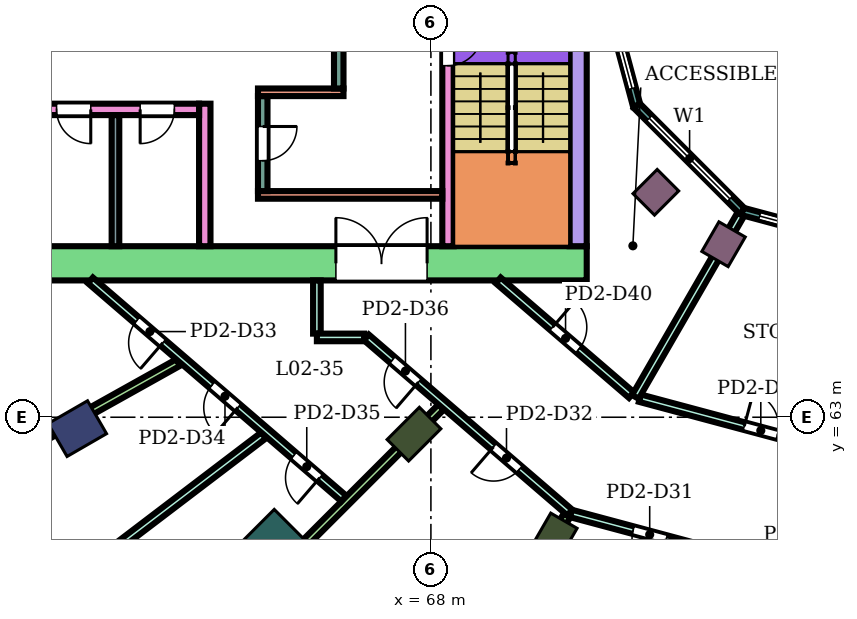
"""IFC4 building model, lengths in metres.
Left out: names, types, materials, properties, quantities, classifications, styles, units other than length and angle.
Written with IfcOpenShell. Run it as: python <this file> out.ifc"""

import sys

from ifc_helpers import new_model, si_unit, direction, frame, frame_2d, origin, origin_2d, place, context, subcontext, project, spatial, rectangle, extrude, element, fill, save


model = new_model("IFC4")
c1 = context("Model", 3, precision=1e-05, world=origin(), true_north=direction((0.0, 1.0)))
c2 = subcontext(c1, "Body", "Model", "MODEL_VIEW")
j1 = project(units=[si_unit("LENGTHUNIT", "METRE"), si_unit("PLANEANGLEUNIT", "RADIAN")], contexts=[c1])
p1 = place(None, origin())
s1 = spatial("IfcSite", under=j1, at=p1, CompositionType="ELEMENT")
p2 = place(p1, origin())
s2 = spatial("IfcBuilding", under=s1, at=p2, CompositionType="ELEMENT")
p3 = place(p2, frame((0.0, 0.0, 12.4)))
s3 = spatial("IfcBuildingStorey", under=s2, at=p3, CompositionType="ELEMENT", Elevation=12.4)
p4 = place(p3, frame((58.696, 62.7, 0.0), z_axis=(0.0, 0.0, 1.0), x_axis=(-0.866025403784, -0.5, 0.0)))
e1 = element("IfcColumn", 1, at=p4, inside=s3, PredefinedType="COLUMN", context=c2, shape_type="SweptSolid", body=[
    extrude(rectangle(XDim=1.2, YDim=1.0, at=origin_2d()), origin(), (0.0, 0.0, 1.0), 5.4),
])
for number, where, z_axis, x_axis in (
    (2, (67.555, 62.555, 0.0), (0.0, 0.0, 1.0), (-0.707, -0.707, 0.0)),
    (3, (71.2, 59.758, 0.0), (0.0, 0.0, 1.0), (-0.5, -0.866, 0.0)),
):
    element("IfcColumn", number, at=place(p3, frame(where, z_axis=z_axis, x_axis=x_axis)), inside=s3, PredefinedType="COLUMN", context=c2, shape_type="SweptSolid", body=[
        extrude(rectangle(XDim=1.2, YDim=0.8, at=origin_2d()), origin(), (0.0, 0.0, 1.0), 5.4),
    ])
for number, where, z_axis, x_axis in (
    (4, (73.919, 68.919, 0.0), (0.0, 0.0, 1.0), (-0.707, -0.707, 0.0)),
    (5, (75.7, 67.552, 0.0), (0.0, 0.0, 1.0), (-0.5, -0.866, 0.0)),
):
    element("IfcColumn", number, at=place(p3, frame(where, z_axis=z_axis, x_axis=x_axis)), inside=s3, PredefinedType="COLUMN", context=c2, shape_type="SweptSolid", body=[
        extrude(rectangle(XDim=0.9, YDim=0.8, at=origin_2d()), origin(), (0.0, 0.0, 1.0), 5.4),
    ])
p5 = place(p3, frame((64.09, 59.09, 0.0), z_axis=(0.0, 0.0, 1.0), x_axis=(-0.707106781187, -0.707106781187, 0.0)))
e6 = element("IfcColumn", 6, at=p5, inside=s3, PredefinedType="COLUMN", context=c2, shape_type="SweptSolid", body=[
    extrude(rectangle(XDim=1.8, YDim=2.4, at=origin_2d()), origin(), (0.0, 0.0, 1.0), 5.4),
])
p6 = place(p3, frame((72.1, 67.05, 0.0), z_axis=(0.0, 0.0, 1.0), x_axis=(-1.0, 0.0, 0.0)))
e7 = element("IfcWall", 7, at=p6, inside=s3, PredefinedType="SHEAR", context=c2, shape_type="SweptSolid", body=[
    extrude(rectangle(XDim=14.6, YDim=0.9, at=frame_2d((7.3, 0.0))), origin(), (0.0, 0.0, 1.0), 4.95),
])
p7 = place(p6, frame((4.2, 0.0, 0.0)))
e8 = element("IfcOpeningElement", 8, at=p7, cuts=e7, PredefinedType="OPENING", context=c2, shape_type="SweptSolid", body=[
    extrude(rectangle(XDim=2.4, YDim=2.4, at=frame_2d((1.2, 1.2))), frame((0.0, 0.46, 0.0), z_axis=(0.0, -1.0, 0.0), x_axis=(1.0, 0.0, 0.0)), (0.0, 0.0, 1.0), 0.92),
])
p8 = place(p3, frame((71.875, 75.0, 0.0), z_axis=(0.0, 0.0, 1.0), x_axis=(0.0, -1.0, 0.0)))
e9 = element("IfcWall", 9, at=p8, inside=s3, PredefinedType="SHEAR", context=c2, shape_type="SweptSolid", body=[
    extrude(rectangle(XDim=7.5, YDim=0.45, at=frame_2d((3.75, 0.0))), origin(), (0.0, 0.0, 1.0), 4.95),
])
p9 = place(p3, frame((68.45, 75.0, 0.0), z_axis=(0.0, 0.0, 1.0), x_axis=(0.0, -1.0, 0.0)))
e10 = element("IfcWall", 10, at=p9, inside=s3, PredefinedType="SHEAR", context=c2, shape_type="SweptSolid", body=[
    extrude(rectangle(XDim=7.5, YDim=0.3, at=frame_2d((3.75, 0.0))), origin(), (0.0, 0.0, 1.0), 4.95),
])
p10 = place(p9, frame((1.85, 0.0, 0.0)))
e11 = element("IfcOpeningElement", 11, at=p10, cuts=e10, PredefinedType="OPENING", context=c2, shape_type="SweptSolid", body=[
    extrude(rectangle(XDim=0.9, YDim=2.1, at=frame_2d((0.45, 1.05))), frame((0.0, 0.16, 0.0), z_axis=(0.0, -1.0, 0.0), x_axis=(1.0, 0.0, 0.0)), (0.0, 0.0, 1.0), 0.32),
])
p11 = place(p3, frame((68.3, 68.85, 0.0), z_axis=(0.0, 0.0, 1.0), x_axis=(-1.0, 0.0, 0.0)))
e12 = element("IfcWall", 12, at=p11, inside=s3, PredefinedType="SHEAR", context=c2, shape_type="SweptSolid", body=[
    extrude(rectangle(XDim=4.85, YDim=0.2, at=frame_2d((2.425, 0.0))), origin(), (0.0, 0.0, 1.0), 4.95),
])
p12 = place(p3, frame((63.575, 71.45, 0.0), z_axis=(0.0, 0.0, 1.0), x_axis=(0.0, -1.0, 0.0)))
e13 = element("IfcWall", 13, at=p12, inside=s3, PredefinedType="SHEAR", context=c2, shape_type="SweptSolid", body=[
    extrude(rectangle(XDim=2.5, YDim=0.25, at=frame_2d((1.25, 0.0))), origin(), (0.0, 0.0, 1.0), 4.95),
])
p13 = place(p12, frame((0.8, 0.0, 0.0)))
e14 = element("IfcOpeningElement", 14, at=p13, cuts=e13, PredefinedType="OPENING", context=c2, shape_type="SweptSolid", body=[
    extrude(rectangle(XDim=0.9, YDim=2.1, at=frame_2d((0.45, 1.05))), frame((0.0, 0.135, 0.0), z_axis=(0.0, -1.0, 0.0), x_axis=(1.0, 0.0, 0.0)), (0.0, 0.0, 1.0), 0.27),
])
p14 = place(p3, frame((65.7, 71.55, 0.0), z_axis=(0.0, 0.0, 1.0), x_axis=(-1.0, 0.0, 0.0)))
e15 = element("IfcWall", 15, at=p14, inside=s3, PredefinedType="SHEAR", context=c2, shape_type="SweptSolid", body=[
    extrude(rectangle(XDim=2.25, YDim=0.2, at=frame_2d((1.125, 0.0))), origin(), (0.0, 0.0, 1.0), 4.95),
])
p15 = place(p3, frame((65.575, 73.15, 0.0), z_axis=(0.0, 0.0, 1.0), x_axis=(0.0, -1.0, 0.0)))
e16 = element("IfcWall", 16, at=p15, inside=s3, PredefinedType="SHEAR", context=c2, shape_type="SweptSolid", body=[
    extrude(rectangle(XDim=1.5, YDim=0.25, at=frame_2d((0.75, 0.0))), origin(), (0.0, 0.0, 1.0), 4.95),
])
p16 = place(p3, frame((62.05, 71.25, 0.0), z_axis=(0.0, 0.0, 1.0), x_axis=(0.0, -1.0, 0.0)))
e17 = element("IfcWall", 17, at=p16, inside=s3, PredefinedType="SHEAR", context=c2, shape_type="SweptSolid", body=[
    extrude(rectangle(XDim=3.75, YDim=0.3, at=frame_2d((1.875, 0.0))), origin(), (0.0, 0.0, 1.0), 4.95),
])
p17 = place(p3, frame((61.9, 71.1, 0.0), z_axis=(0.0, 0.0, 1.0), x_axis=(-1.0, 0.0, 0.0)))
e18 = element("IfcWall", 18, at=p17, inside=s3, PredefinedType="SHEAR", context=c2, shape_type="SweptSolid", body=[
    extrude(rectangle(XDim=4.4, YDim=0.3, at=frame_2d((2.2, 0.0))), origin(), (0.0, 0.0, 1.0), 4.95),
])
p18 = place(p17, frame((0.65, 0.0, 0.0)))
e19 = element("IfcOpeningElement", 19, at=p18, cuts=e18, PredefinedType="OPENING", context=c2, shape_type="SweptSolid", body=[
    extrude(rectangle(XDim=0.9, YDim=2.1, at=frame_2d((0.45, 1.05))), frame((0.0, 0.16, 0.0), z_axis=(0.0, -1.0, 0.0), x_axis=(1.0, 0.0, 0.0)), (0.0, 0.0, 1.0), 0.32),
])
p19 = place(p17, frame((2.85, 0.0, 0.0)))
e20 = element("IfcOpeningElement", 20, at=p19, cuts=e18, PredefinedType="OPENING", context=c2, shape_type="SweptSolid", body=[
    extrude(rectangle(XDim=0.9, YDim=2.1, at=frame_2d((0.45, 1.05))), frame((0.0, 0.16, 0.0), z_axis=(0.0, -1.0, 0.0), x_axis=(1.0, 0.0, 0.0)), (0.0, 0.0, 1.0), 0.32),
])
p20 = place(p3, frame((72.396, 75.0, 0.0), z_axis=(0.0, 0.0, 1.0), x_axis=(0.258789828301, -0.965933654434, 0.0)))
e21 = element("IfcWall", 21, at=p20, inside=s3, PredefinedType="NOTDEFINED", context=c2, shape_type="SweptSolid", body=[
    extrude(rectangle(XDim=3.936, YDim=0.2, at=frame_2d((1.968, 0.0))), origin(), (0.0, 0.0, 1.0), 5.4),
])
p21 = place(p20, frame((0.468, 0.0, 0.9)))
e22 = element("IfcOpeningElement", 22, at=p21, cuts=e21, PredefinedType="OPENING", context=c2, shape_type="SweptSolid", body=[
    extrude(rectangle(XDim=3.0, YDim=2.3, at=frame_2d((1.5, 1.15))), frame((0.0, 0.11, 0.0), z_axis=(0.0, -1.0, 0.0), x_axis=(1.0, 0.0, 0.0)), (0.0, 0.0, 1.0), 0.22),
])
p22 = place(p3, frame((73.415, 71.198, 0.0), z_axis=(0.0, 0.0, 1.0), x_axis=(0.707106781187, -0.707106781187, 0.0)))
e23 = element("IfcWall", 23, at=p22, inside=s3, PredefinedType="NOTDEFINED", context=c2, shape_type="SweptSolid", body=[
    extrude(rectangle(XDim=3.936, YDim=0.2, at=frame_2d((1.968, 0.0))), origin(), (0.0, 0.0, 1.0), 5.4),
])
p23 = place(p22, frame((0.468, 0.0, 0.9)))
e24 = element("IfcOpeningElement", 24, at=p23, cuts=e23, PredefinedType="OPENING", context=c2, shape_type="SweptSolid", body=[
    extrude(rectangle(XDim=3.0, YDim=2.3, at=frame_2d((1.5, 1.15))), frame((0.0, 0.11, 0.0), z_axis=(0.0, -1.0, 0.0), x_axis=(1.0, 0.0, 0.0)), (0.0, 0.0, 1.0), 0.22),
])
p24 = place(p3, frame((76.198, 68.415, 0.0), z_axis=(0.0, 0.0, 1.0), x_axis=(0.965933654434, -0.258789828301, 0.0)))
e25 = element("IfcWall", 25, at=p24, inside=s3, PredefinedType="NOTDEFINED", context=c2, shape_type="SweptSolid", body=[
    extrude(rectangle(XDim=3.936, YDim=0.2, at=frame_2d((1.968, 0.0))), origin(), (0.0, 0.0, 1.0), 5.4),
])
p25 = place(p24, frame((0.468, 0.0, 0.9)))
e26 = element("IfcOpeningElement", 26, at=p25, cuts=e25, PredefinedType="OPENING", context=c2, shape_type="SweptSolid", body=[
    extrude(rectangle(XDim=3.0, YDim=2.3, at=frame_2d((1.5, 1.15))), frame((0.0, 0.11, 0.0), z_axis=(0.0, -1.0, 0.0), x_axis=(1.0, 0.0, 0.0)), (0.0, 0.0, 1.0), 0.22),
])
p26 = place(p3, frame((48.85, 57.458, 0.0), z_axis=(0.0, 0.0, 1.0), x_axis=(0.873063492433, 0.487606540338, 0.0)))
e27 = element("IfcWall", 27, at=p26, inside=s3, PredefinedType="PARTITIONING", context=c2, shape_type="SweptSolid", body=[
    extrude(rectangle(XDim=14.316, YDim=0.2, at=frame_2d((7.158, 0.0))), origin(), (0.0, 0.0, 1.0), 3.75),
])
p27 = place(p3, frame((51.704, 53.475, 0.0), z_axis=(0.0, 0.0, 1.0), x_axis=(0.795886023824, 0.60544647747, 0.0)))
e28 = element("IfcWall", 28, at=p27, inside=s3, PredefinedType="PARTITIONING", context=c2, shape_type="SweptSolid", body=[
    extrude(rectangle(XDim=14.944, YDim=0.2, at=frame_2d((7.472, 0.0))), origin(), (0.0, 0.0, 1.0), 4.95),
])
p28 = place(p3, frame((54.687, 49.687, 0.0), z_axis=(0.0, 0.0, 1.0), x_axis=(0.707106781187, 0.707106781187, 0.0)))
e29 = element("IfcWall", 29, at=p28, inside=s3, PredefinedType="PARTITIONING", context=c2, shape_type="SweptSolid", body=[
    extrude(rectangle(XDim=19.203, YDim=0.2, at=frame_2d((9.602, 0.0))), origin(), (0.0, 0.0, 1.0), 3.75),
])
p29 = place(p3, frame((59.041, 66.6, 0.0), z_axis=(0.0, 0.0, 1.0), x_axis=(0.757842003705, -0.652438117695, 0.0)))
e30 = element("IfcWall", 30, at=p29, inside=s3, PredefinedType="PARTITIONING", context=c2, shape_type="SweptSolid", body=[
    extrude(rectangle(XDim=8.795, YDim=0.2, at=frame_2d((4.397, 0.0))), origin(), (0.0, 0.0, 1.0), 4.95),
])
p30 = place(p29, frame((1.614, 0.0, 0.0)))
e31 = element("IfcOpeningElement", 31, at=p30, cuts=e30, PredefinedType="OPENING", context=c2, shape_type="SweptSolid", body=[
    extrude(rectangle(XDim=0.9, YDim=2.1, at=frame_2d((0.45, 1.05))), frame((0.0, 0.11, 0.0), z_axis=(0.0, -1.0, 0.0), x_axis=(1.0, 0.0, 0.0)), (0.0, 0.0, 1.0), 0.22),
])
p31 = place(p29, frame((4.222, 0.0, 0.0)))
e32 = element("IfcOpeningElement", 32, at=p31, cuts=e30, PredefinedType="OPENING", context=c2, shape_type="SweptSolid", body=[
    extrude(rectangle(XDim=0.9, YDim=2.1, at=frame_2d((0.45, 1.05))), frame((0.0, 0.11, 0.0), z_axis=(0.0, -1.0, 0.0), x_axis=(1.0, 0.0, 0.0)), (0.0, 0.0, 1.0), 0.22),
])
p32 = place(p29, frame((7.061, 0.0, 0.0)))
e33 = element("IfcOpeningElement", 33, at=p32, cuts=e30, PredefinedType="OPENING", context=c2, shape_type="SweptSolid", body=[
    extrude(rectangle(XDim=0.9, YDim=2.1, at=frame_2d((0.45, 1.05))), frame((0.0, 0.11, 0.0), z_axis=(0.0, -1.0, 0.0), x_axis=(1.0, 0.0, 0.0)), (0.0, 0.0, 1.0), 0.22),
])
p33 = place(p3, frame((62.099, 43.999, 0.0), z_axis=(0.0, 0.0, 1.0), x_axis=(0.500043499619, 0.866000287811, 0.0)))
e34 = element("IfcWall", 34, at=p33, inside=s3, PredefinedType="PARTITIONING", context=c2, shape_type="SweptSolid", body=[
    extrude(rectangle(XDim=18.958, YDim=0.2, at=frame_2d((9.479, 0.0))), origin(), (0.0, 0.0, 1.0), 3.75),
])
p34 = place(p3, frame((65.0, 65.2, 0.0), z_axis=(0.0, 0.0, 1.0), x_axis=(0.0, 1.0, 0.0)))
e35 = element("IfcWall", 35, at=p34, inside=s3, PredefinedType="PARTITIONING", context=c2, shape_type="SweptSolid", body=[
    extrude(rectangle(XDim=1.399, YDim=0.2, at=frame_2d((0.7, 0.0))), origin(), (0.0, 0.0, 1.0), 4.95),
])
p35 = place(p3, frame((65.0, 65.1, 0.0), z_axis=(0.0, 0.0, 1.0), x_axis=(1.0, 0.0, 0.0)))
e36 = element("IfcWall", 36, at=p35, inside=s3, PredefinedType="PARTITIONING", context=c2, shape_type="SweptSolid", body=[
    extrude(rectangle(XDim=1.242, YDim=0.2, at=frame_2d((0.621, 0.0))), origin(), (0.0, 0.0, 1.0), 4.95),
])
p36 = place(p3, frame((66.302, 65.1, 0.0), z_axis=(0.0, 0.0, 1.0), x_axis=(0.757895579626, -0.652375881209, 0.0)))
e37 = element("IfcWall", 37, at=p36, inside=s3, PredefinedType="PARTITIONING", context=c2, shape_type="SweptSolid", body=[
    extrude(rectangle(XDim=7.062, YDim=0.2, at=frame_2d((3.531, 0.0))), origin(), (0.0, 0.0, 1.0), 4.95),
])
p37 = place(p36, frame((4.414, 0.0, 0.0)))
e38 = element("IfcOpeningElement", 38, at=p37, cuts=e37, PredefinedType="OPENING", context=c2, shape_type="SweptSolid", body=[
    extrude(rectangle(XDim=0.9, YDim=2.1, at=frame_2d((0.45, 1.05))), frame((0.0, 0.11, 0.0), z_axis=(0.0, -1.0, 0.0), x_axis=(1.0, 0.0, 0.0)), (0.0, 0.0, 1.0), 0.22),
])
p38 = place(p36, frame((0.906, 0.0, 0.0)))
e39 = element("IfcOpeningElement", 39, at=p38, cuts=e37, PredefinedType="OPENING", context=c2, shape_type="SweptSolid", body=[
    extrude(rectangle(XDim=0.9, YDim=2.1, at=frame_2d((0.45, 1.05))), frame((0.0, 0.11, 0.0), z_axis=(0.0, -1.0, 0.0), x_axis=(1.0, 0.0, 0.0)), (0.0, 0.0, 1.0), 0.22),
])
p39 = place(p3, frame((69.771, 66.6, 0.0), z_axis=(0.0, 0.0, 1.0), x_axis=(0.758040611529, -0.652207352974, 0.0)))
e40 = element("IfcWall", 40, at=p39, inside=s3, PredefinedType="PARTITIONING", context=c2, shape_type="SweptSolid", body=[
    extrude(rectangle(XDim=4.625, YDim=0.2, at=frame_2d((2.312, 0.0))), origin(), (0.0, 0.0, 1.0), 4.95),
])
p40 = place(p39, frame((1.887, 0.0, 0.0)))
e41 = element("IfcOpeningElement", 41, at=p40, cuts=e40, PredefinedType="OPENING", context=c2, shape_type="SweptSolid", body=[
    extrude(rectangle(XDim=0.9, YDim=2.1, at=frame_2d((0.45, 1.05))), frame((0.0, 0.11, 0.0), z_axis=(0.0, -1.0, 0.0), x_axis=(1.0, 0.0, 0.0)), (0.0, 0.0, 1.0), 0.22),
])
p41 = place(p3, frame((71.685, 60.468, 0.0), z_axis=(0.0, 0.0, 1.0), x_axis=(0.96590736437, -0.258887936097, 0.0)))
e42 = element("IfcWall", 42, at=p41, inside=s3, PredefinedType="PARTITIONING", context=c2, shape_type="SweptSolid", body=[
    extrude(rectangle(XDim=8.519, YDim=0.2, at=frame_2d((4.259, 0.0))), origin(), (0.0, 0.0, 1.0), 4.95),
])
p42 = place(p41, frame((5.979, 0.0, 0.0)))
e43 = element("IfcOpeningElement", 43, at=p42, cuts=e42, PredefinedType="OPENING", context=c2, shape_type="SweptSolid", body=[
    extrude(rectangle(XDim=0.9, YDim=2.1, at=frame_2d((0.45, 1.05))), frame((0.0, 0.11, 0.0), z_axis=(0.0, -1.0, 0.0), x_axis=(1.0, 0.0, 0.0)), (0.0, 0.0, 1.0), 0.22),
])
p43 = place(p41, frame((1.695, 0.0, 0.0)))
e44 = element("IfcOpeningElement", 44, at=p43, cuts=e42, PredefinedType="OPENING", context=c2, shape_type="SweptSolid", body=[
    extrude(rectangle(XDim=0.9, YDim=2.1, at=frame_2d((0.45, 1.05))), frame((0.0, 0.11, 0.0), z_axis=(0.0, -1.0, 0.0), x_axis=(1.0, 0.0, 0.0)), (0.0, 0.0, 1.0), 0.22),
])
p44 = place(p3, frame((73.499, 63.502, 0.0), z_axis=(0.0, 0.0, 1.0), x_axis=(0.965923617359, -0.258827288799, 0.0)))
e45 = element("IfcWall", 45, at=p44, inside=s3, PredefinedType="PARTITIONING", context=c2, shape_type="SweptSolid", body=[
    extrude(rectangle(XDim=6.601, YDim=0.2, at=frame_2d((3.3, 0.0))), origin(), (0.0, 0.0, 1.0), 4.95),
])
p45 = place(p44, frame((2.844, 0.0, 0.0)))
e46 = element("IfcOpeningElement", 46, at=p45, cuts=e45, PredefinedType="OPENING", context=c2, shape_type="SweptSolid", body=[
    extrude(rectangle(XDim=0.9, YDim=2.1, at=frame_2d((0.45, 1.05))), frame((0.0, 0.11, 0.0), z_axis=(0.0, -1.0, 0.0), x_axis=(1.0, 0.0, 0.0)), (0.0, 0.0, 1.0), 0.22),
])
p46 = place(p3, frame((73.379, 63.534, 0.0), z_axis=(0.0, 0.0, 1.0), x_axis=(0.500033892615, 0.86600583499, 0.0)))
e47 = element("IfcWall", 47, at=p46, inside=s3, PredefinedType="PARTITIONING", context=c2, shape_type="SweptSolid", body=[
    extrude(rectangle(XDim=5.542, YDim=0.2, at=frame_2d((2.771, 0.0))), origin(), (0.0, 0.0, 1.0), 4.95),
])
p47 = place(p3, frame((59.7, 70.95, 0.0), z_axis=(0.0, 0.0, 1.0), x_axis=(0.0, -1.0, 0.0)))
e48 = element("IfcWall", 48, at=p47, inside=s3, PredefinedType="PARTITIONING", context=c2, shape_type="SweptSolid", body=[
    extrude(rectangle(XDim=3.45, YDim=0.2, at=frame_2d((1.725, 0.0))), origin(), (0.0, 0.0, 1.0), 4.95),
])
p48 = place(p21, origin())
e49 = element("IfcWindow", 49, at=p48, inside=s3, PartitioningType="SINGLE_PANEL", PredefinedType="WINDOW", context=c2, shape_type="SweptSolid", body=[
    extrude(rectangle(XDim=3.0, YDim=2.3, at=frame_2d((1.5, 1.15))), frame((0.0, 0.03, 0.0), z_axis=(0.0, -1.0, 0.0), x_axis=(1.0, 0.0, 0.0)), (0.0, 0.0, 1.0), 0.06),
])
fill(e22, e49)
p49 = place(p23, origin())
e50 = element("IfcWindow", 50, at=p49, inside=s3, PartitioningType="SINGLE_PANEL", PredefinedType="WINDOW", context=c2, shape_type="SweptSolid", body=[
    extrude(rectangle(XDim=3.0, YDim=2.3, at=frame_2d((1.5, 1.15))), frame((0.0, 0.03, 0.0), z_axis=(0.0, -1.0, 0.0), x_axis=(1.0, 0.0, 0.0)), (0.0, 0.0, 1.0), 0.06),
])
fill(e24, e50)
p50 = place(p25, origin())
e51 = element("IfcWindow", 51, at=p50, inside=s3, PartitioningType="SINGLE_PANEL", PredefinedType="WINDOW", context=c2, shape_type="SweptSolid", body=[
    extrude(rectangle(XDim=3.0, YDim=2.3, at=frame_2d((1.5, 1.15))), frame((0.0, 0.03, 0.0), z_axis=(0.0, -1.0, 0.0), x_axis=(1.0, 0.0, 0.0)), (0.0, 0.0, 1.0), 0.06),
])
fill(e26, e51)
p51 = place(p43, frame((0.9, 0.0, 0.0), z_axis=(0.0, 0.0, 1.0), x_axis=(-1.0, 0.0, 0.0)))
e52 = element("IfcDoor", 52, at=p51, inside=s3, OperationType="SINGLE_SWING_LEFT", PredefinedType="DOOR", context=c2, shape_type="SweptSolid", body=[
    extrude(rectangle(XDim=0.9, YDim=2.1, at=frame_2d((0.45, 1.05))), frame((0.0, 0.025, 0.0), z_axis=(0.0, -1.0, 0.0), x_axis=(1.0, 0.0, 0.0)), (0.0, 0.0, 1.0), 0.05),
])
fill(e44, e52)
p52 = place(p37, frame((0.9, 0.0, 0.0), z_axis=(0.0, 0.0, 1.0), x_axis=(-1.0, 0.0, 0.0)))
e53 = element("IfcDoor", 53, at=p52, inside=s3, OperationType="SINGLE_SWING_RIGHT", PredefinedType="DOOR", context=c2, shape_type="SweptSolid", body=[
    extrude(rectangle(XDim=0.9, YDim=2.1, at=frame_2d((0.45, 1.05))), frame((0.0, 0.025, 0.0), z_axis=(0.0, -1.0, 0.0), x_axis=(1.0, 0.0, 0.0)), (0.0, 0.0, 1.0), 0.05),
])
fill(e38, e53)
p53 = place(p30, frame((0.9, 0.0, 0.0), z_axis=(0.0, 0.0, 1.0), x_axis=(-1.0, 0.0, 0.0)))
e54 = element("IfcDoor", 54, at=p53, inside=s3, OperationType="SINGLE_SWING_LEFT", PredefinedType="DOOR", context=c2, shape_type="SweptSolid", body=[
    extrude(rectangle(XDim=0.9, YDim=2.1, at=frame_2d((0.45, 1.05))), frame((0.0, 0.025, 0.0), z_axis=(0.0, -1.0, 0.0), x_axis=(1.0, 0.0, 0.0)), (0.0, 0.0, 1.0), 0.05),
])
fill(e31, e54)
p54 = place(p31, frame((0.9, 0.0, 0.0), z_axis=(0.0, 0.0, 1.0), x_axis=(-1.0, 0.0, 0.0)))
e55 = element("IfcDoor", 55, at=p54, inside=s3, OperationType="SINGLE_SWING_LEFT", PredefinedType="DOOR", context=c2, shape_type="SweptSolid", body=[
    extrude(rectangle(XDim=0.9, YDim=2.1, at=frame_2d((0.45, 1.05))), frame((0.0, 0.025, 0.0), z_axis=(0.0, -1.0, 0.0), x_axis=(1.0, 0.0, 0.0)), (0.0, 0.0, 1.0), 0.05),
])
fill(e32, e55)
p55 = place(p32, frame((0.9, 0.0, 0.0), z_axis=(0.0, 0.0, 1.0), x_axis=(-1.0, 0.0, 0.0)))
e56 = element("IfcDoor", 56, at=p55, inside=s3, OperationType="SINGLE_SWING_LEFT", PredefinedType="DOOR", context=c2, shape_type="SweptSolid", body=[
    extrude(rectangle(XDim=0.9, YDim=2.1, at=frame_2d((0.45, 1.05))), frame((0.0, 0.025, 0.0), z_axis=(0.0, -1.0, 0.0), x_axis=(1.0, 0.0, 0.0)), (0.0, 0.0, 1.0), 0.05),
])
fill(e33, e56)
p56 = place(p38, frame((0.9, 0.0, 0.0), z_axis=(0.0, 0.0, 1.0), x_axis=(-1.0, 0.0, 0.0)))
e57 = element("IfcDoor", 57, at=p56, inside=s3, OperationType="SINGLE_SWING_LEFT", PredefinedType="DOOR", context=c2, shape_type="SweptSolid", body=[
    extrude(rectangle(XDim=0.9, YDim=2.1, at=frame_2d((0.45, 1.05))), frame((0.0, 0.025, 0.0), z_axis=(0.0, -1.0, 0.0), x_axis=(1.0, 0.0, 0.0)), (0.0, 0.0, 1.0), 0.05),
])
fill(e39, e57)
p57 = place(p45, origin())
e58 = element("IfcDoor", 58, at=p57, inside=s3, OperationType="SINGLE_SWING_LEFT", PredefinedType="DOOR", context=c2, shape_type="SweptSolid", body=[
    extrude(rectangle(XDim=0.9, YDim=2.1, at=frame_2d((0.45, 1.05))), frame((0.0, 0.025, 0.0), z_axis=(0.0, -1.0, 0.0), x_axis=(1.0, 0.0, 0.0)), (0.0, 0.0, 1.0), 0.05),
])
fill(e46, e58)
p58 = place(p40, origin())
e59 = element("IfcDoor", 59, at=p58, inside=s3, OperationType="SINGLE_SWING_LEFT", PredefinedType="DOOR", context=c2, shape_type="SweptSolid", body=[
    extrude(rectangle(XDim=0.9, YDim=2.1, at=frame_2d((0.45, 1.05))), frame((0.0, 0.025, 0.0), z_axis=(0.0, -1.0, 0.0), x_axis=(1.0, 0.0, 0.0)), (0.0, 0.0, 1.0), 0.05),
])
fill(e41, e59)
p59 = place(p10, origin())
e60 = element("IfcDoor", 60, at=p59, inside=s3, OperationType="SINGLE_SWING_LEFT", PredefinedType="DOOR", context=c2, shape_type="SweptSolid", body=[
    extrude(rectangle(XDim=0.9, YDim=2.1, at=frame_2d((0.45, 1.05))), frame((0.0, 0.025, 0.0), z_axis=(0.0, -1.0, 0.0), x_axis=(1.0, 0.0, 0.0)), (0.0, 0.0, 1.0), 0.05),
])
fill(e11, e60)
p60 = place(p13, origin())
e61 = element("IfcDoor", 61, at=p60, inside=s3, OperationType="SINGLE_SWING_LEFT", PredefinedType="DOOR", context=c2, shape_type="SweptSolid", body=[
    extrude(rectangle(XDim=0.9, YDim=2.1, at=frame_2d((0.45, 1.05))), frame((0.0, 0.025, 0.0), z_axis=(0.0, -1.0, 0.0), x_axis=(1.0, 0.0, 0.0)), (0.0, 0.0, 1.0), 0.05),
])
fill(e14, e61)
p61 = place(p18, origin())
e62 = element("IfcDoor", 62, at=p61, inside=s3, OperationType="SINGLE_SWING_RIGHT", PredefinedType="DOOR", context=c2, shape_type="SweptSolid", body=[
    extrude(rectangle(XDim=0.9, YDim=2.1, at=frame_2d((0.45, 1.05))), frame((0.0, 0.025, 0.0), z_axis=(0.0, -1.0, 0.0), x_axis=(1.0, 0.0, 0.0)), (0.0, 0.0, 1.0), 0.05),
])
fill(e19, e62)
p62 = place(p19, origin())
e63 = element("IfcDoor", 63, at=p62, inside=s3, OperationType="SINGLE_SWING_LEFT", PredefinedType="DOOR", context=c2, shape_type="SweptSolid", body=[
    extrude(rectangle(XDim=0.9, YDim=2.1, at=frame_2d((0.45, 1.05))), frame((0.0, 0.025, 0.0), z_axis=(0.0, -1.0, 0.0), x_axis=(1.0, 0.0, 0.0)), (0.0, 0.0, 1.0), 0.05),
])
fill(e20, e63)
p63 = place(p7, frame((2.4, 0.0, 0.0), z_axis=(0.0, 0.0, 1.0), x_axis=(-1.0, 0.0, 0.0)))
e64 = element("IfcDoor", 64, at=p63, inside=s3, OperationType="DOUBLE_DOOR_SINGLE_SWING", PredefinedType="DOOR", context=c2, shape_type="SweptSolid", body=[
    extrude(rectangle(XDim=2.4, YDim=2.4, at=frame_2d((1.2, 1.2))), frame((0.0, 0.025, 0.0), z_axis=(0.0, -1.0, 0.0), x_axis=(1.0, 0.0, 0.0)), (0.0, 0.0, 1.0), 0.05),
])
fill(e8, e64)
save(model, sys.argv[1])
